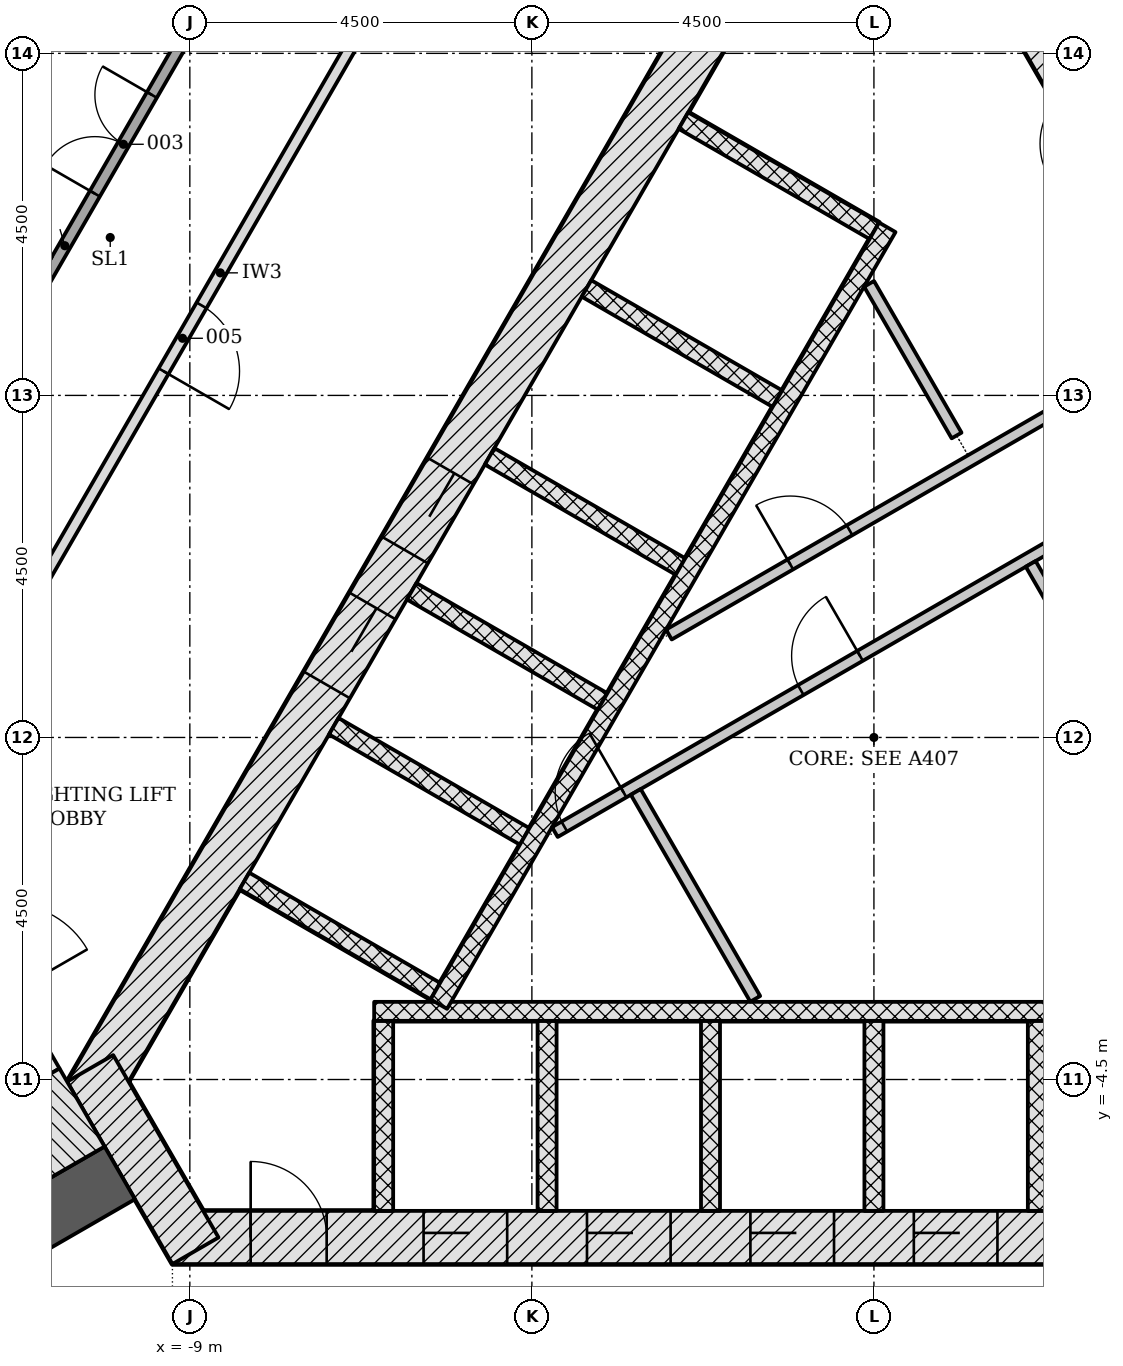
"""IFC4 building model, lengths in metres.
Left out: names, types, materials, properties, quantities, classifications, styles, units other than length and angle.
Written with IfcOpenShell. Run it as: python <this file> out.ifc"""

import sys

from ifc_helpers import new_model, si_unit, direction, frame, frame_2d, origin, place, context, subcontext, project, spatial, rectangle, extrude, element, fill, save


model = new_model("IFC4")
c1 = context("Model", 3, precision=1e-05, world=origin(), true_north=direction((0.0, 1.0)))
c2 = subcontext(c1, "Body", "Model", "MODEL_VIEW")
j1 = project(units=[si_unit("LENGTHUNIT", "METRE"), si_unit("PLANEANGLEUNIT", "RADIAN")], contexts=[c1])
p1 = place(None, origin())
s1 = spatial("IfcSite", under=j1, at=p1, CompositionType="ELEMENT")
p2 = place(p1, origin())
s2 = spatial("IfcBuilding", under=s1, at=p2, CompositionType="ELEMENT")
p3 = place(p2, frame((0.0, 0.0, 109.5)))
s3 = spatial("IfcBuildingStorey", under=s2, at=p3, CompositionType="ELEMENT", Elevation=109.5)
p4 = place(p3, frame((-9.229, -6.578, -0.2), z_axis=(0.0, 0.0, 1.0), x_axis=(1.0, 0.0, 0.0)))
e1 = element("IfcWall", 1, at=p4, inside=s3, PredefinedType="SHEAR", context=c2, shape_type="SweptSolid", body=[
    extrude(rectangle(XDim=18.458, YDim=0.7, at=frame_2d((9.229, 0.0))), origin(), (0.0, 0.0, 1.0), 3.6),
])
p5 = place(p4, frame((3.304, 0.0, 0.2)))
e2 = element("IfcOpeningElement", 2, at=p5, cuts=e1, PredefinedType="OPENING", context=c2, shape_type="SweptSolid", body=[
    extrude(rectangle(XDim=1.1, YDim=2.1, at=frame_2d((0.55, 1.05))), frame((0.0, 0.36, 0.0), z_axis=(0.0, -1.0, 0.0), x_axis=(1.0, 0.0, 0.0)), (0.0, 0.0, 1.0), 0.72),
])
p6 = place(p4, frame((5.454, 0.0, 0.2)))
e3 = element("IfcOpeningElement", 3, at=p6, cuts=e1, PredefinedType="OPENING", context=c2, shape_type="SweptSolid", body=[
    extrude(rectangle(XDim=1.1, YDim=2.1, at=frame_2d((0.55, 1.05))), frame((0.0, 0.36, 0.0), z_axis=(0.0, -1.0, 0.0), x_axis=(1.0, 0.0, 0.0)), (0.0, 0.0, 1.0), 0.72),
])
p7 = place(p4, frame((7.604, 0.0, 0.2)))
e4 = element("IfcOpeningElement", 4, at=p7, cuts=e1, PredefinedType="OPENING", context=c2, shape_type="SweptSolid", body=[
    extrude(rectangle(XDim=1.1, YDim=2.1, at=frame_2d((0.55, 1.05))), frame((0.0, 0.36, 0.0), z_axis=(0.0, -1.0, 0.0), x_axis=(1.0, 0.0, 0.0)), (0.0, 0.0, 1.0), 0.72),
])
p8 = place(p4, frame((9.754, 0.0, 0.2)))
e5 = element("IfcOpeningElement", 5, at=p8, cuts=e1, PredefinedType="OPENING", context=c2, shape_type="SweptSolid", body=[
    extrude(rectangle(XDim=1.1, YDim=2.1, at=frame_2d((0.55, 1.05))), frame((0.0, 0.36, 0.0), z_axis=(0.0, -1.0, 0.0), x_axis=(1.0, 0.0, 0.0)), (0.0, 0.0, 1.0), 0.72),
])
p9 = place(p4, frame((11.904, 0.0, 0.2)))
e6 = element("IfcOpeningElement", 6, at=p9, cuts=e1, PredefinedType="OPENING", context=c2, shape_type="SweptSolid", body=[
    extrude(rectangle(XDim=1.1, YDim=2.1, at=frame_2d((0.55, 1.05))), frame((0.0, 0.36, 0.0), z_axis=(0.0, -1.0, 0.0), x_axis=(1.0, 0.0, 0.0)), (0.0, 0.0, 1.0), 0.72),
])
p10 = place(p4, frame((14.054, 0.0, 0.2)))
e7 = element("IfcOpeningElement", 7, at=p10, cuts=e1, PredefinedType="OPENING", context=c2, shape_type="SweptSolid", body=[
    extrude(rectangle(XDim=1.1, YDim=2.1, at=frame_2d((0.55, 1.05))), frame((0.0, 0.36, 0.0), z_axis=(0.0, -1.0, 0.0), x_axis=(1.0, 0.0, 0.0)), (0.0, 0.0, 1.0), 0.72),
])
p11 = place(p4, frame((1.029, 0.0, 0.2)))
e8 = element("IfcOpeningElement", 8, at=p11, cuts=e1, PredefinedType="OPENING", context=c2, shape_type="SweptSolid", body=[
    extrude(rectangle(XDim=1.0, YDim=2.1, at=frame_2d((0.5, 1.05))), frame((0.0, 0.36, 0.0), z_axis=(0.0, -1.0, 0.0), x_axis=(1.0, 0.0, 0.0)), (0.0, 0.0, 1.0), 0.72),
])
p12 = place(p3, frame((10.311, -4.703, -0.2), z_axis=(0.0, 0.0, 1.0), x_axis=(-0.500001446645, 0.866024568562, 0.0)))
e9 = element("IfcWall", 9, at=p12, inside=s3, PredefinedType="SHEAR", context=c2, shape_type="SweptSolid", body=[
    extrude(rectangle(XDim=18.458, YDim=0.7, at=frame_2d((9.229, 0.0))), origin(), (0.0, 0.0, 1.0), 3.6),
])
p13 = place(p12, frame((10.5, 0.0, 0.2)))
e10 = element("IfcOpeningElement", 10, at=p13, cuts=e9, PredefinedType="OPENING", context=c2, shape_type="SweptSolid", body=[
    extrude(rectangle(XDim=1.0, YDim=2.1, at=frame_2d((0.5, 1.05))), frame((0.0, 0.36, 0.0), z_axis=(0.0, -1.0, 0.0), x_axis=(1.0, 0.0, 0.0)), (0.0, 0.0, 1.0), 0.72),
])
p14 = place(p12, frame((4.877, 0.0, 0.2)))
e11 = element("IfcOpeningElement", 11, at=p14, cuts=e9, PredefinedType="OPENING", context=c2, shape_type="SweptSolid", body=[
    extrude(rectangle(XDim=0.9, YDim=2.1, at=frame_2d((0.45, 1.05))), frame((0.0, 0.36, 0.0), z_axis=(0.0, -1.0, 0.0), x_axis=(1.0, 0.0, 0.0)), (0.0, 0.0, 1.0), 0.72),
])
p15 = place(p12, frame((14.452, 0.0, 0.2)))
e12 = element("IfcOpeningElement", 12, at=p15, cuts=e9, PredefinedType="OPENING", context=c2, shape_type="SweptSolid", body=[
    extrude(rectangle(XDim=0.9, YDim=2.1, at=frame_2d((0.45, 1.05))), frame((0.0, 0.36, 0.0), z_axis=(0.0, -1.0, 0.0), x_axis=(1.0, 0.0, 0.0)), (0.0, 0.0, 1.0), 0.72),
])
p16 = place(p3, frame((-1.083, 11.281, -0.2), z_axis=(0.0, 0.0, 1.0), x_axis=(-0.500001446645, -0.866024568562, 0.0)))
e13 = element("IfcWall", 13, at=p16, inside=s3, PredefinedType="SHEAR", context=c2, shape_type="SweptSolid", body=[
    extrude(rectangle(XDim=18.458, YDim=0.7, at=frame_2d((9.229, 0.0))), origin(), (0.0, 0.0, 1.0), 3.6),
])
p17 = place(p16, frame((8.979, 0.0, 0.2)))
e14 = element("IfcOpeningElement", 14, at=p17, cuts=e13, PredefinedType="OPENING", context=c2, shape_type="SweptSolid", body=[
    extrude(rectangle(XDim=1.2, YDim=2.1, at=frame_2d((0.6, 1.05))), frame((0.0, 0.36, 0.0), z_axis=(0.0, -1.0, 0.0), x_axis=(1.0, 0.0, 0.0)), (0.0, 0.0, 1.0), 0.72),
])
p18 = place(p16, frame((11.029, 0.0, 0.2)))
e15 = element("IfcOpeningElement", 15, at=p18, cuts=e13, PredefinedType="OPENING", context=c2, shape_type="SweptSolid", body=[
    extrude(rectangle(XDim=1.2, YDim=2.1, at=frame_2d((0.6, 1.05))), frame((0.0, 0.36, 0.0), z_axis=(0.0, -1.0, 0.0), x_axis=(1.0, 0.0, 0.0)), (0.0, 0.0, 1.0), 0.72),
])
p19 = place(p3, frame((-10.311, -4.353, -0.2), z_axis=(0.0, 0.0, 1.0), x_axis=(0.500042739161, -0.866000726912, 0.0)))
e16 = element("IfcWall", 16, at=p19, inside=s3, PredefinedType="SHEAR", context=c2, shape_type="SweptSolid", body=[
    extrude(rectangle(XDim=2.771, YDim=0.7, at=frame_2d((1.386, 0.0))), origin(), (0.0, 0.0, 1.0), 3.6),
])
p20 = place(p3, frame((-9.922, -5.728, -0.2), z_axis=(0.0, 0.0, 1.0), x_axis=(-0.866027307971, -0.499996701837, 0.0)))
e17 = element("IfcWall", 17, at=p20, inside=s3, PredefinedType="SHEAR", context=c2, shape_type="SweptSolid", body=[
    extrude(rectangle(XDim=11.918, YDim=0.8, at=frame_2d((5.959, 0.0))), origin(), (0.0, 0.0, 1.0), 3.6),
])
for number, where, z_axis, x_axis in (
    (18, (-6.45, -6.228, -0.2), (0.0, 0.0, 1.0), (0.0, 1.0, 0.0)),
    (19, (-4.3, -6.228, -0.2), (0.0, 0.0, 1.0), (0.0, 1.0, 0.0)),
    (20, (-2.15, -6.228, -0.2), (0.0, 0.0, 1.0), (0.0, 1.0, 0.0)),
    (21, (0.0, -6.228, -0.2), (0.0, 0.0, 1.0), (0.0, 1.0, 0.0)),
    (22, (2.15, -6.228, -0.2), (0.0, 0.0, 1.0), (0.0, 1.0, 0.0)),
):
    element("IfcWall", number, at=place(p3, frame(where, z_axis=z_axis, x_axis=x_axis)), inside=s3, PredefinedType="PARTITIONING", context=c2, shape_type="SweptSolid", body=[
        extrude(rectangle(XDim=2.5, YDim=0.25, at=frame_2d((1.25, 0.0))), origin(), (0.0, 0.0, 1.0), 3.6),
    ])
p21 = place(p3, frame((-6.575, -3.603, 0.0), z_axis=(0.0, 0.0, 1.0), x_axis=(1.0, 0.0, 0.0)))
e23 = element("IfcWall", 23, at=p21, inside=s3, PredefinedType="PARTITIONING", context=c2, shape_type="SweptSolid", body=[
    extrude(rectangle(XDim=13.15, YDim=0.25, at=frame_2d((6.575, 0.0))), origin(), (0.0, 0.0, 1.0), 3.4),
])
p22 = place(p3, frame((-2.506, 8.115, -0.2), z_axis=(0.0, 0.0, 1.0), x_axis=(0.865996321171, -0.50005036918, 0.0)))
e24 = element("IfcWall", 24, at=p22, inside=s3, PredefinedType="PARTITIONING", context=c2, shape_type="SweptSolid", body=[
    extrude(rectangle(XDim=2.9, YDim=0.25, at=frame_2d((1.45, 0.0))), origin(), (0.0, 0.0, 1.0), 3.6),
])
for number, where, z_axis, x_axis in (
    (25, (-3.781, 5.907, -0.2), (0.0, 0.0, 1.0), (0.866, -0.5, 0.0)),
    (26, (-5.056, 3.699, -0.2), (0.0, 0.0, 1.0), (0.866, -0.5, 0.0)),
    (27, (-6.081, 1.923, -0.2), (0.0, 0.0, 1.0), (0.866, -0.5, 0.0)),
    (28, (-7.106, 0.148, -0.2), (0.0, 0.0, 1.0), (0.866, -0.5, 0.0)),
    (29, (-8.281, -1.887, -0.2), (0.0, 0.0, 1.0), (0.866, -0.5, 0.0)),
):
    element("IfcWall", number, at=place(p3, frame(where, z_axis=z_axis, x_axis=x_axis)), inside=s3, PredefinedType="PARTITIONING", context=c2, shape_type="SweptSolid", body=[
        extrude(rectangle(XDim=2.9, YDim=0.25, at=frame_2d((1.45, 0.0))), origin(), (0.0, 0.0, 1.0), 3.6),
    ])
p23 = place(p3, frame((0.176, 6.711, 0.0), z_axis=(0.0, 0.0, 1.0), x_axis=(-0.500004227369, -0.866022963098, 0.0)))
e30 = element("IfcWall", 30, at=p23, inside=s3, PredefinedType="PARTITIONING", context=c2, shape_type="SweptSolid", body=[
    extrude(rectangle(XDim=11.8, YDim=0.25, at=frame_2d((5.9, 0.0))), origin(), (0.0, 0.0, 1.0), 3.4),
])
p24 = place(p3, frame((-4.198, -1.244, 0.0), z_axis=(0.0, 0.0, 1.0), x_axis=(0.866020798945, 0.500007975732, 0.0)))
e31 = element("IfcWall", 31, at=p24, inside=s3, PredefinedType="PARTITIONING", context=c2, shape_type="SweptSolid", body=[
    extrude(rectangle(XDim=10.486, YDim=0.15, at=frame_2d((5.243, 0.0))), origin(), (0.0, 0.0, 1.0), 3.4),
])
p25 = place(p24, frame((3.736, 0.0, 0.0)))
e32 = element("IfcOpeningElement", 32, at=p25, cuts=e31, PredefinedType="OPENING", context=c2, shape_type="SweptSolid", body=[
    extrude(rectangle(XDim=0.9, YDim=2.1, at=frame_2d((0.45, 1.05))), frame((0.0, 0.085, 0.0), z_axis=(0.0, -1.0, 0.0), x_axis=(1.0, 0.0, 0.0)), (0.0, 0.0, 1.0), 0.17),
])
p26 = place(p24, frame((0.144, 0.0, 0.0)))
e33 = element("IfcOpeningElement", 33, at=p26, cuts=e31, PredefinedType="OPENING", context=c2, shape_type="SweptSolid", body=[
    extrude(rectangle(XDim=0.9, YDim=2.1, at=frame_2d((0.45, 1.05))), frame((0.0, 0.085, 0.0), z_axis=(0.0, -1.0, 0.0), x_axis=(1.0, 0.0, 0.0)), (0.0, 0.0, 1.0), 0.17),
])
p27 = place(p3, frame((5.367, -3.439, 0.0), z_axis=(0.0, 0.0, 1.0), x_axis=(-0.499981499682, 0.866036084685, 0.0)))
e34 = element("IfcWall", 34, at=p27, inside=s3, PredefinedType="PARTITIONING", context=c2, shape_type="SweptSolid", body=[
    extrude(rectangle(XDim=6.608, YDim=0.15, at=frame_2d((3.304, 0.0))), origin(), (0.0, 0.0, 1.0), 3.4),
])
p28 = place(p3, frame((-1.561, -3.439, 0.0), z_axis=(0.0, 0.0, 1.0), x_axis=(-0.499989077369, 0.866031709877, 0.0)))
e35 = element("IfcWall", 35, at=p28, inside=s3, PredefinedType="PARTITIONING", context=c2, shape_type="SweptSolid", body=[
    extrude(rectangle(XDim=3.144, YDim=0.15, at=frame_2d((1.572, 0.0))), origin(), (0.0, 0.0, 1.0), 3.4),
])
p29 = place(p3, frame((-2.698, 1.354, 0.0), z_axis=(0.0, 0.0, 1.0), x_axis=(0.866021157486, 0.500007354732, 0.0)))
e36 = element("IfcWall", 36, at=p29, inside=s3, PredefinedType="PARTITIONING", context=c2, shape_type="SweptSolid", body=[
    extrude(rectangle(XDim=7.888, YDim=0.15, at=frame_2d((3.944, 0.0))), origin(), (0.0, 0.0, 1.0), 3.4),
])
p30 = place(p29, frame((1.845, 0.0, 0.0)))
e37 = element("IfcOpeningElement", 37, at=p30, cuts=e36, PredefinedType="OPENING", context=c2, shape_type="SweptSolid", body=[
    extrude(rectangle(XDim=0.9, YDim=2.1, at=frame_2d((0.45, 1.05))), frame((0.0, 0.085, 0.0), z_axis=(0.0, -1.0, 0.0), x_axis=(1.0, 0.0, 0.0)), (0.0, 0.0, 1.0), 0.17),
])
p31 = place(p3, frame((1.088, 3.972, 0.0), z_axis=(0.0, 0.0, 1.0), x_axis=(-0.500116913307, 0.865957893332, 0.0)))
e38 = element("IfcWall", 38, at=p31, inside=s3, PredefinedType="PARTITIONING", context=c2, shape_type="SweptSolid", body=[
    extrude(rectangle(XDim=2.304, YDim=0.15, at=frame_2d((1.152, 0.0))), origin(), (0.0, 0.0, 1.0), 3.4),
])
p32 = place(p3, frame((-12.576, -1.331, -0.2), z_axis=(0.0, 0.0, 1.0), x_axis=(0.499970499736, -0.8660424351, 0.0)))
e39 = element("IfcWall", 39, at=p32, inside=s3, PredefinedType="SHEAR", context=c2, shape_type="SweptSolid", body=[
    extrude(rectangle(XDim=3.55, YDim=0.2, at=frame_2d((1.775, 0.0))), origin(), (0.0, 0.0, 1.0), 3.6),
])
p33 = place(p32, frame((1.175, 0.0, 0.2)))
e40 = element("IfcOpeningElement", 40, at=p33, cuts=e39, PredefinedType="OPENING", context=c2, shape_type="SweptSolid", body=[
    extrude(rectangle(XDim=1.2, YDim=2.1, at=frame_2d((0.6, 1.05))), frame((0.0, 0.11, 0.0), z_axis=(0.0, -1.0, 0.0), x_axis=(1.0, 0.0, 0.0)), (0.0, 0.0, 1.0), 0.22),
])
p34 = place(p3, frame((-10.418, -4.868, -0.2), z_axis=(0.0, 0.0, 1.0), x_axis=(-0.866018442252, -0.500012057535, 0.0)))
e41 = element("IfcWall", 41, at=p34, inside=s3, PredefinedType="SHEAR", context=c2, shape_type="SweptSolid", body=[
    extrude(rectangle(XDim=7.2, YDim=1.186, at=frame_2d((3.6, 0.0))), origin(), (0.0, 0.0, 1.0), 3.6),
])
p35 = place(p3, frame((-16.169, -3.099, 0.0), z_axis=(0.0, 0.0, 1.0), x_axis=(0.499999805269, 0.866025516212, 0.0)))
e42 = element("IfcWall", 42, at=p35, inside=s3, PredefinedType="PARTITIONING", context=c2, shape_type="SweptSolid", body=[
    extrude(rectangle(XDim=22.097, YDim=0.15, at=frame_2d((11.049, 0.0))), origin(), (0.0, 0.0, 1.0), 2.847),
])
p36 = place(p35, frame((17.776, 0.0, 0.0)))
e43 = element("IfcOpeningElement", 43, at=p36, cuts=e42, PredefinedType="OPENING", context=c2, shape_type="SweptSolid", body=[
    extrude(rectangle(XDim=1.0, YDim=2.1, at=frame_2d((0.5, 1.05))), frame((0.0, 0.085, 0.0), z_axis=(0.0, -1.0, 0.0), x_axis=(1.0, 0.0, 0.0)), (0.0, 0.0, 1.0), 0.17),
])
p37 = place(p35, frame((15.186, 0.0, 0.0)))
e44 = element("IfcOpeningElement", 44, at=p37, cuts=e42, PredefinedType="OPENING", context=c2, shape_type="SweptSolid", body=[
    extrude(rectangle(XDim=1.0, YDim=2.1, at=frame_2d((0.5, 1.05))), frame((0.0, 0.085, 0.0), z_axis=(0.0, -1.0, 0.0), x_axis=(1.0, 0.0, 0.0)), (0.0, 0.0, 1.0), 0.17),
])
p38 = place(p35, frame((11.84, 0.0, 0.0)))
e45 = element("IfcOpeningElement", 45, at=p38, cuts=e42, PredefinedType="OPENING", context=c2, shape_type="SweptSolid", body=[
    extrude(rectangle(XDim=1.5, YDim=2.1, at=frame_2d((0.75, 1.05))), frame((0.0, 0.085, 0.0), z_axis=(0.0, -1.0, 0.0), x_axis=(1.0, 0.0, 0.0)), (0.0, 0.0, 1.0), 0.17),
])
p39 = place(p35, frame((4.503, 0.0, 0.0)))
e46 = element("IfcOpeningElement", 46, at=p39, cuts=e42, PredefinedType="OPENING", context=c2, shape_type="SweptSolid", body=[
    extrude(rectangle(XDim=1.5, YDim=2.1, at=frame_2d((0.75, 1.05))), frame((0.0, 0.085, 0.0), z_axis=(0.0, -1.0, 0.0), x_axis=(1.0, 0.0, 0.0)), (0.0, 0.0, 1.0), 0.17),
])
p40 = place(p3, frame((-4.407, 13.374, 0.0), z_axis=(0.0, 0.0, 1.0), x_axis=(-0.499997181693, -0.866027030928, 0.0)))
e47 = element("IfcWall", 47, at=p40, inside=s3, PredefinedType="PARTITIONING", context=c2, shape_type="SweptSolid", body=[
    extrude(rectangle(XDim=16.77, YDim=0.15, at=frame_2d((8.385, 0.0))), origin(), (0.0, 0.0, 1.0), 2.847),
])
p41 = place(p40, frame((8.879, 0.0, 0.0)))
e48 = element("IfcOpeningElement", 48, at=p41, cuts=e47, PredefinedType="OPENING", context=c2, shape_type="SweptSolid", body=[
    extrude(rectangle(XDim=1.0, YDim=2.1, at=frame_2d((0.5, 1.05))), frame((0.0, 0.085, 0.0), z_axis=(0.0, -1.0, 0.0), x_axis=(1.0, 0.0, 0.0)), (0.0, 0.0, 1.0), 0.17),
])
p42 = place(p3, frame((-11.345, -7.012, 0.0), z_axis=(0.0, 0.0, 1.0), x_axis=(0.499998569178, -0.866026229868, 0.0)))
e49 = element("IfcWall", 49, at=p42, inside=s3, PredefinedType="PARTITIONING", context=c2, shape_type="SweptSolid", body=[
    extrude(rectangle(XDim=2.143, YDim=0.15, at=frame_2d((1.072, 0.0))), origin(), (0.0, 0.0, 1.0), 3.4),
])
p43 = place(p5, origin())
e50 = element("IfcDoor", 50, at=p43, inside=s3, OperationType="DOUBLE_DOOR_SLIDING", PredefinedType="DOOR", context=c2, shape_type="SweptSolid", body=[
    extrude(rectangle(XDim=1.1, YDim=2.1, at=frame_2d((0.55, 1.05))), frame((0.0, 0.025, 0.0), z_axis=(0.0, -1.0, 0.0), x_axis=(1.0, 0.0, 0.0)), (0.0, 0.0, 1.0), 0.05),
])
fill(e2, e50)
p44 = place(p6, origin())
e51 = element("IfcDoor", 51, at=p44, inside=s3, OperationType="DOUBLE_DOOR_SLIDING", PredefinedType="DOOR", context=c2, shape_type="SweptSolid", body=[
    extrude(rectangle(XDim=1.1, YDim=2.1, at=frame_2d((0.55, 1.05))), frame((0.0, 0.025, 0.0), z_axis=(0.0, -1.0, 0.0), x_axis=(1.0, 0.0, 0.0)), (0.0, 0.0, 1.0), 0.05),
])
fill(e3, e51)
p45 = place(p7, origin())
e52 = element("IfcDoor", 52, at=p45, inside=s3, OperationType="DOUBLE_DOOR_SLIDING", PredefinedType="DOOR", context=c2, shape_type="SweptSolid", body=[
    extrude(rectangle(XDim=1.1, YDim=2.1, at=frame_2d((0.55, 1.05))), frame((0.0, 0.025, 0.0), z_axis=(0.0, -1.0, 0.0), x_axis=(1.0, 0.0, 0.0)), (0.0, 0.0, 1.0), 0.05),
])
fill(e4, e52)
p46 = place(p8, origin())
e53 = element("IfcDoor", 53, at=p46, inside=s3, OperationType="DOUBLE_DOOR_SLIDING", PredefinedType="DOOR", context=c2, shape_type="SweptSolid", body=[
    extrude(rectangle(XDim=1.1, YDim=2.1, at=frame_2d((0.55, 1.05))), frame((0.0, 0.025, 0.0), z_axis=(0.0, -1.0, 0.0), x_axis=(1.0, 0.0, 0.0)), (0.0, 0.0, 1.0), 0.05),
])
fill(e5, e53)
p47 = place(p17, origin())
e54 = element("IfcDoor", 54, at=p47, inside=s3, OperationType="DOUBLE_DOOR_SLIDING", PredefinedType="DOOR", context=c2, shape_type="SweptSolid", body=[
    extrude(rectangle(XDim=1.2, YDim=2.1, at=frame_2d((0.6, 1.05))), frame((0.0, 0.025, 0.0), z_axis=(0.0, -1.0, 0.0), x_axis=(1.0, 0.0, 0.0)), (0.0, 0.0, 1.0), 0.05),
])
fill(e14, e54)
p48 = place(p18, origin())
e55 = element("IfcDoor", 55, at=p48, inside=s3, OperationType="DOUBLE_DOOR_SLIDING", PredefinedType="DOOR", context=c2, shape_type="SweptSolid", body=[
    extrude(rectangle(XDim=1.2, YDim=2.1, at=frame_2d((0.6, 1.05))), frame((0.0, 0.025, 0.0), z_axis=(0.0, -1.0, 0.0), x_axis=(1.0, 0.0, 0.0)), (0.0, 0.0, 1.0), 0.05),
])
fill(e15, e55)
p49 = place(p25, origin())
e56 = element("IfcDoor", 56, at=p49, inside=s3, OperationType="SINGLE_SWING_RIGHT", PredefinedType="DOOR", context=c2, shape_type="SweptSolid", body=[
    extrude(rectangle(XDim=0.9, YDim=2.1, at=frame_2d((0.45, 1.05))), frame((0.0, 0.025, 0.0), z_axis=(0.0, -1.0, 0.0), x_axis=(1.0, 0.0, 0.0)), (0.0, 0.0, 1.0), 0.05),
])
fill(e32, e56)
p50 = place(p30, origin())
e57 = element("IfcDoor", 57, at=p50, inside=s3, OperationType="SINGLE_SWING_LEFT", PredefinedType="DOOR", context=c2, shape_type="SweptSolid", body=[
    extrude(rectangle(XDim=0.9, YDim=2.1, at=frame_2d((0.45, 1.05))), frame((0.0, 0.025, 0.0), z_axis=(0.0, -1.0, 0.0), x_axis=(1.0, 0.0, 0.0)), (0.0, 0.0, 1.0), 0.05),
])
fill(e37, e57)
p51 = place(p26, origin())
e58 = element("IfcDoor", 58, at=p51, inside=s3, OperationType="SINGLE_SWING_RIGHT", PredefinedType="DOOR", context=c2, shape_type="SweptSolid", body=[
    extrude(rectangle(XDim=0.9, YDim=2.1, at=frame_2d((0.45, 1.05))), frame((0.0, 0.025, 0.0), z_axis=(0.0, -1.0, 0.0), x_axis=(1.0, 0.0, 0.0)), (0.0, 0.0, 1.0), 0.05),
])
fill(e33, e58)
p52 = place(p11, origin())
e59 = element("IfcDoor", 59, at=p52, inside=s3, OperationType="SINGLE_SWING_LEFT", PredefinedType="DOOR", context=c2, shape_type="SweptSolid", body=[
    extrude(rectangle(XDim=1.0, YDim=2.1, at=frame_2d((0.5, 1.05))), frame((0.0, 0.075, 0.0), z_axis=(0.0, -1.0, 0.0), x_axis=(1.0, 0.0, 0.0)), (0.0, 0.0, 1.0), 0.15),
])
fill(e8, e59)
p53 = place(p38, origin())
e60 = element("IfcDoor", 60, at=p53, inside=s3, OperationType="DOUBLE_DOOR_SINGLE_SWING", PredefinedType="DOOR", context=c2, shape_type="SweptSolid", body=[
    extrude(rectangle(XDim=1.5, YDim=2.1, at=frame_2d((0.75, 1.05))), frame((0.0, 0.025, 0.0), z_axis=(0.0, -1.0, 0.0), x_axis=(1.0, 0.0, 0.0)), (0.0, 0.0, 1.0), 0.05),
])
fill(e45, e60)
p54 = place(p41, origin())
e61 = element("IfcDoor", 61, at=p54, inside=s3, OperationType="SINGLE_SWING_RIGHT", PredefinedType="DOOR", context=c2, shape_type="SweptSolid", body=[
    extrude(rectangle(XDim=1.0, YDim=2.1, at=frame_2d((0.5, 1.05))), frame((0.0, 0.025, 0.0), z_axis=(0.0, -1.0, 0.0), x_axis=(1.0, 0.0, 0.0)), (0.0, 0.0, 1.0), 0.05),
])
fill(e48, e61)
save(model, sys.argv[1])
